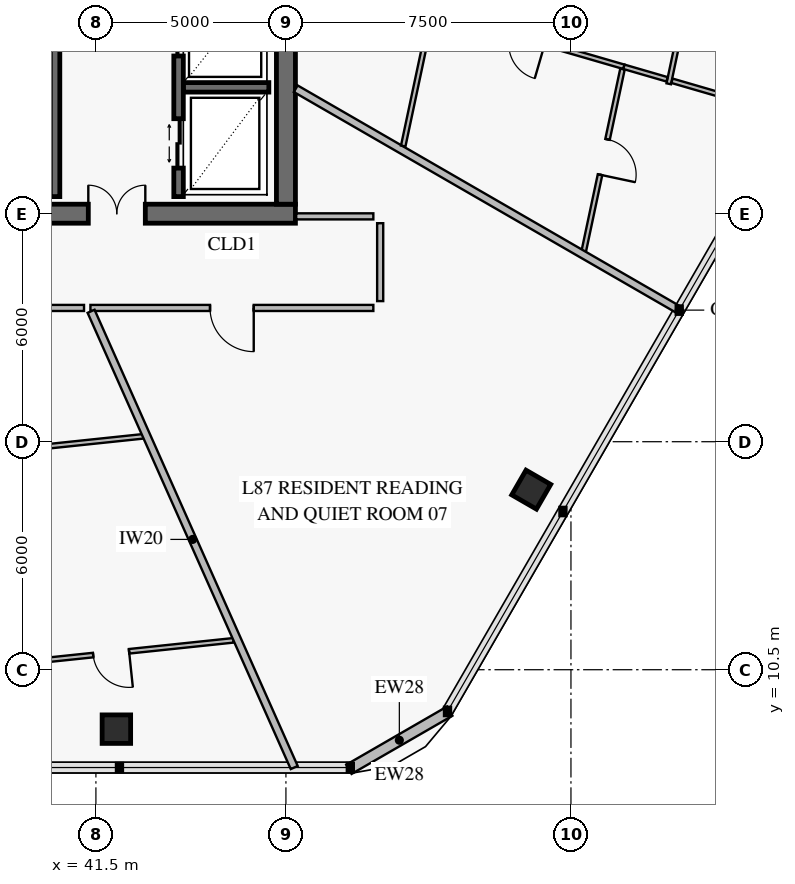
"""IFC4 building model, lengths in metres.
Left out: names, types, materials, properties, quantities, classifications, styles, units other than length and angle.
Written with IfcOpenShell. Run it as: python <this file> out.ifc"""

import sys

from ifc_helpers import new_model, si_unit, direction, frame, frame_2d, origin, origin_2d, place, context, subcontext, project, spatial, rectangle, extrude, element, fill, save


model = new_model("IFC4")
c1 = context("Model", 3, precision=1e-05, world=origin(), true_north=direction((0.0, 1.0)))
c2 = subcontext(c1, "Body", "Model", "MODEL_VIEW")
j1 = project(units=[si_unit("LENGTHUNIT", "METRE"), si_unit("PLANEANGLEUNIT", "RADIAN")], contexts=[c1])
p1 = place(None, origin())
s1 = spatial("IfcSite", under=j1, at=p1, CompositionType="ELEMENT")
p2 = place(p1, origin())
s2 = spatial("IfcBuilding", under=s1, at=p2, CompositionType="ELEMENT")
p3 = place(p2, frame((0.0, 0.0, 342.4)))
s3 = spatial("IfcBuildingStorey", under=s2, at=p3, CompositionType="ELEMENT", Elevation=342.4)
p4 = place(p3, frame((37.35, 22.5, 0.0), z_axis=(0.0, 0.0, 1.0), x_axis=(1.0, 0.0, 0.0)))
e1 = element("IfcWall", 1, at=p4, inside=s3, PredefinedType="SHEAR", context=c2, shape_type="SweptSolid", body=[
    extrude(rectangle(XDim=9.4, YDim=0.5, at=frame_2d((4.7, 0.0))), origin(), (0.0, 0.0, 1.0), 3.8),
])
p5 = place(p4, frame((3.95, 0.0, 0.0)))
e2 = element("IfcOpeningElement", 2, at=p5, cuts=e1, PredefinedType="OPENING", context=c2, shape_type="SweptSolid", body=[
    extrude(rectangle(XDim=1.5, YDim=2.15, at=frame_2d((0.75, 1.075))), frame((0.0, 0.262, 0.0), z_axis=(0.0, -1.0, 0.0), x_axis=(1.0, 0.0, 0.0)), (0.0, 0.0, 1.0), 0.524),
])
p6 = place(p3, frame((46.5, 22.75, 0.0), z_axis=(0.0, 0.0, 1.0), x_axis=(0.0, 1.0, 0.0)))
e3 = element("IfcWall", 3, at=p6, inside=s3, PredefinedType="SHEAR", context=c2, shape_type="SweptSolid", body=[
    extrude(rectangle(XDim=18.5, YDim=0.5, at=frame_2d((9.25, 0.0))), origin(), (0.0, 0.0, 1.0), 3.8),
])
p7 = place(p6, frame((9.0, 0.0, 0.0)))
e4 = element("IfcOpeningElement", 4, at=p7, cuts=e3, PredefinedType="OPENING", context=c2, shape_type="SweptSolid", body=[
    extrude(rectangle(XDim=1.1, YDim=2.15, at=frame_2d((0.55, 1.075))), frame((0.0, 0.262, 0.0), z_axis=(0.0, -1.0, 0.0), x_axis=(1.0, 0.0, 0.0)), (0.0, 0.0, 1.0), 0.524),
])
for number, where, z_axis, x_axis in (
    (5, (42.039, 8.936, 0.0), (0.0, 0.0, 1.0), (1.0, 0.0, 0.0)),
    (6, (52.955, 15.238, 0.0), (0.0, 0.0, 1.0), (0.5, 0.866, 0.0)),
):
    element("IfcColumn", number, at=place(p3, frame(where, z_axis=z_axis, x_axis=x_axis)), inside=s3, PredefinedType="COLUMN", context=c2, shape_type="SweptSolid", body=[
        extrude(rectangle(XDim=0.75, YDim=0.75, at=origin_2d()), origin(), (0.0, 0.0, 1.0), 3.55),
    ])
p8 = place(p3, frame((50.811, 9.411, 0.0), z_axis=(0.0, 0.0, 1.0), x_axis=(-0.866023752521, -0.50000286006, 0.0)))
e7 = element("IfcWall", 7, at=p8, inside=s3, PredefinedType="SOLIDWALL", context=c2, shape_type="SweptSolid", body=[
    extrude(rectangle(XDim=3.065, YDim=0.28, at=frame_2d((1.532, 0.0))), origin(), (0.0, 0.0, 1.0), 3.55),
])
p9 = place(p3, frame((40.425, 22.95, 0.0), z_axis=(0.0, 0.0, 1.0), x_axis=(0.0, 1.0, 0.0)))
e8 = element("IfcWall", 8, at=p9, inside=s3, PredefinedType="SOLIDWALL", context=c2, shape_type="SweptSolid", body=[
    extrude(rectangle(XDim=8.2, YDim=0.25, at=frame_2d((4.1, 0.0))), origin(), (0.0, 0.0, 1.0), 3.8),
])
p10 = place(p3, frame((43.8, 25.825, 0.0), z_axis=(0.0, 0.0, 1.0), x_axis=(1.0, 0.0, 0.0)))
e9 = element("IfcWall", 9, at=p10, inside=s3, PredefinedType="SOLIDWALL", context=c2, shape_type="SweptSolid", body=[
    extrude(rectangle(XDim=2.25, YDim=0.25, at=frame_2d((1.125, 0.0))), origin(), (0.0, 0.0, 1.0), 3.8),
])
p11 = place(p3, frame((43.675, 22.95, 0.0), z_axis=(0.0, 0.0, 1.0), x_axis=(0.0, 1.0, 0.0)))
e10 = element("IfcWall", 10, at=p11, inside=s3, PredefinedType="SOLIDWALL", context=c2, shape_type="SweptSolid", body=[
    extrude(rectangle(XDim=8.2, YDim=0.25, at=frame_2d((4.1, 0.0))), origin(), (0.0, 0.0, 1.0), 3.8),
])
p12 = place(p11, frame((0.75, 0.0, 0.0)))
e11 = element("IfcOpeningElement", 11, at=p12, cuts=e10, PredefinedType="OPENING", context=c2, shape_type="SweptSolid", body=[
    extrude(rectangle(XDim=1.3, YDim=2.3, at=frame_2d((0.65, 1.15))), frame((0.0, 0.137, 0.0), z_axis=(0.0, -1.0, 0.0), x_axis=(1.0, 0.0, 0.0)), (0.0, 0.0, 1.0), 0.274),
])
p13 = place(p11, frame((3.7, 0.0, 0.0)))
e12 = element("IfcOpeningElement", 12, at=p13, cuts=e10, PredefinedType="OPENING", context=c2, shape_type="SweptSolid", body=[
    extrude(rectangle(XDim=1.3, YDim=2.3, at=frame_2d((0.65, 1.15))), frame((0.0, 0.137, 0.0), z_axis=(0.0, -1.0, 0.0), x_axis=(1.0, 0.0, 0.0)), (0.0, 0.0, 1.0), 0.274),
])
p14 = place(p11, frame((6.62, 0.0, 0.0)))
e13 = element("IfcOpeningElement", 13, at=p14, cuts=e10, PredefinedType="OPENING", context=c2, shape_type="SweptSolid", body=[
    extrude(rectangle(XDim=0.9, YDim=2.1, at=frame_2d((0.45, 1.05))), frame((0.0, 0.137, 0.0), z_axis=(0.0, -1.0, 0.0), x_axis=(1.0, 0.0, 0.0)), (0.0, 0.0, 1.0), 0.274),
])
p15 = place(p3, frame((38.846, 10.614, 0.0), z_axis=(0.0, 0.0, 1.0), x_axis=(0.994523460233, 0.1045135735, 0.0)))
e14 = element("IfcWall", 14, at=p15, inside=s3, PredefinedType="PARTITIONING", context=c2, shape_type="SweptSolid", body=[
    extrude(rectangle(XDim=6.31, YDim=0.12, at=frame_2d((3.155, 0.0))), origin(), (0.0, 0.0, 1.0), 3.0),
])
p16 = place(p15, frame((2.596, 0.0, 0.0)))
e15 = element("IfcOpeningElement", 15, at=p16, cuts=e14, PredefinedType="OPENING", context=c2, shape_type="SweptSolid", body=[
    extrude(rectangle(XDim=0.95, YDim=2.1, at=frame_2d((0.475, 1.05))), frame((0.0, 0.072, 0.0), z_axis=(0.0, -1.0, 0.0), x_axis=(1.0, 0.0, 0.0)), (0.0, 0.0, 1.0), 0.144),
])
p17 = place(p3, frame((41.356, 20.02, 0.0), z_axis=(0.0, 0.0, 1.0), x_axis=(1.0, 0.0, 0.0)))
e16 = element("IfcWall", 16, at=p17, inside=s3, PredefinedType="PARTITIONING", context=c2, shape_type="SweptSolid", body=[
    extrude(rectangle(XDim=7.444, YDim=0.16, at=frame_2d((3.722, 0.0))), origin(), (0.0, 0.0, 1.0), 3.0),
])
p18 = place(p17, frame((3.147, 0.0, 0.0)))
e17 = element("IfcOpeningElement", 17, at=p18, cuts=e16, PredefinedType="OPENING", context=c2, shape_type="SweptSolid", body=[
    extrude(rectangle(XDim=1.15, YDim=2.2, at=frame_2d((0.575, 1.1))), frame((0.0, 0.092, 0.0), z_axis=(0.0, -1.0, 0.0), x_axis=(1.0, 0.0, 0.0)), (0.0, 0.0, 1.0), 0.184),
])
p19 = place(p3, frame((56.573, 25.919, 0.0), z_axis=(0.0, 0.0, 1.0), x_axis=(0.207884804538, 0.978153315203, 0.0)))
e18 = element("IfcWall", 18, at=p19, inside=s3, PredefinedType="PARTITIONING", context=c2, shape_type="SweptSolid", body=[
    extrude(rectangle(XDim=8.519, YDim=0.12, at=frame_2d((4.26, 0.0))), origin(), (0.0, 0.0, 1.0), 3.0),
])
p20 = place(p19, frame((1.728, 0.0, 0.0)))
e19 = element("IfcOpeningElement", 19, at=p20, cuts=e18, PredefinedType="OPENING", context=c2, shape_type="SweptSolid", body=[
    extrude(rectangle(XDim=0.95, YDim=2.1, at=frame_2d((0.475, 1.05))), frame((0.0, 0.072, 0.0), z_axis=(0.0, -1.0, 0.0), x_axis=(1.0, 0.0, 0.0)), (0.0, 0.0, 1.0), 0.144),
])
p21 = place(p19, frame((5.747, 0.0, 0.0)))
e20 = element("IfcOpeningElement", 20, at=p21, cuts=e18, PredefinedType="OPENING", context=c2, shape_type="SweptSolid", body=[
    extrude(rectangle(XDim=0.95, YDim=2.1, at=frame_2d((0.475, 1.05))), frame((0.0, 0.072, 0.0), z_axis=(0.0, -1.0, 0.0), x_axis=(1.0, 0.0, 0.0)), (0.0, 0.0, 1.0), 0.144),
])
p22 = place(p3, frame((50.365, 27.826, 0.0), z_axis=(0.0, 0.0, 1.0), x_axis=(0.960293456694, -0.278991894201, 0.0)))
e21 = element("IfcWall", 21, at=p22, inside=s3, PredefinedType="PARTITIONING", context=c2, shape_type="SweptSolid", body=[
    extrude(rectangle(XDim=5.237, YDim=0.12, at=frame_2d((2.618, 0.0))), origin(), (0.0, 0.0, 1.0), 3.2),
])
p23 = place(p22, frame((2.118, 0.0, 0.0)))
e22 = element("IfcOpeningElement", 22, at=p23, cuts=e21, PredefinedType="OPENING", context=c2, shape_type="SweptSolid", body=[
    extrude(rectangle(XDim=0.95, YDim=2.1, at=frame_2d((0.475, 1.05))), frame((0.0, 0.072, 0.0), z_axis=(0.0, -1.0, 0.0), x_axis=(1.0, 0.0, 0.0)), (0.0, 0.0, 1.0), 0.144),
])
p24 = place(p3, frame((54.336, 21.511, 0.0), z_axis=(0.0, 0.0, 1.0), x_axis=(0.207920104204, 0.978145812376, 0.0)))
e23 = element("IfcWall", 23, at=p24, inside=s3, PredefinedType="PARTITIONING", context=c2, shape_type="SweptSolid", body=[
    extrude(rectangle(XDim=4.902, YDim=0.12, at=frame_2d((2.451, 0.0))), origin(), (0.0, 0.0, 1.0), 3.55),
])
p25 = place(p24, frame((2.06, 0.0, 0.0)))
e24 = element("IfcOpeningElement", 24, at=p25, cuts=e23, PredefinedType="OPENING", context=c2, shape_type="SweptSolid", body=[
    extrude(rectangle(XDim=0.95, YDim=2.1, at=frame_2d((0.475, 1.05))), frame((0.0, 0.072, 0.0), z_axis=(0.0, -1.0, 0.0), x_axis=(1.0, 0.0, 0.0)), (0.0, 0.0, 1.0), 0.144),
])
p26 = place(p3, frame((38.126, 16.156, 0.0), z_axis=(0.0, 0.0, 1.0), x_axis=(0.994525709455, 0.104492168289, 0.0)))
e25 = element("IfcWall", 25, at=p26, inside=s3, PredefinedType="PARTITIONING", context=c2, shape_type="SweptSolid", body=[
    extrude(rectangle(XDim=4.685, YDim=0.12, at=frame_2d((2.342, 0.0))), origin(), (0.0, 0.0, 1.0), 3.0),
])
p27 = place(p3, frame((41.373, 19.932, 0.0), z_axis=(0.0, 0.0, 1.0), x_axis=(0.406736471648, -0.913545533967, 0.0)))
e26 = element("IfcWall", 26, at=p27, inside=s3, PredefinedType="PARTITIONING", context=c2, shape_type="SweptSolid", body=[
    extrude(rectangle(XDim=13.142, YDim=0.2, at=frame_2d((6.571, 0.0))), origin(), (0.0, 0.0, 1.0), 2.97),
])
p28 = place(p3, frame((46.758, 25.789, 0.0), z_axis=(0.0, 0.0, 1.0), x_axis=(0.866025778731, -0.499999350573, 0.0)))
e27 = element("IfcWall", 27, at=p28, inside=s3, PredefinedType="PARTITIONING", context=c2, shape_type="SweptSolid", body=[
    extrude(rectangle(XDim=11.652, YDim=0.2, at=frame_2d((5.826, 0.0))), origin(), (0.0, 0.0, 1.0), 2.97),
])
p29 = place(p3, frame((55.394, 26.365, 0.0), z_axis=(0.0, 0.0, 1.0), x_axis=(0.960281932935, -0.279031556062, 0.0)))
e28 = element("IfcWall", 28, at=p29, inside=s3, PredefinedType="PARTITIONING", context=c2, shape_type="SweptSolid", body=[
    extrude(rectangle(XDim=1.181, YDim=0.12, at=frame_2d((0.591, 0.0))), origin(), (0.0, 0.0, 1.0), 3.55),
])
p30 = place(p3, frame((56.659, 25.998, 0.0), z_axis=(0.0, 0.0, 1.0), x_axis=(0.960282504677, -0.279029588417, 0.0)))
e29 = element("IfcWall", 29, at=p30, inside=s3, PredefinedType="PARTITIONING", context=c2, shape_type="SweptSolid", body=[
    extrude(rectangle(XDim=2.02, YDim=0.12, at=frame_2d((1.01, 0.0))), origin(), (0.0, 0.0, 1.0), 3.55),
])
p31 = place(p3, frame((49.586, 24.281, 0.0), z_axis=(0.0, 0.0, 1.0), x_axis=(0.207984930921, 0.978132030203, 0.0)))
e30 = element("IfcWall", 30, at=p31, inside=s3, PredefinedType="PARTITIONING", context=c2, shape_type="SweptSolid", body=[
    extrude(rectangle(XDim=3.564, YDim=0.12, at=frame_2d((1.782, 0.0))), origin(), (0.0, 0.0, 1.0), 3.55),
])
p32 = place(p3, frame((37.625, 20.02, 0.0), z_axis=(0.0, 0.0, 1.0), x_axis=(1.0, 0.0, 0.0)))
e31 = element("IfcWall", 31, at=p32, inside=s3, PredefinedType="PARTITIONING", context=c2, shape_type="SweptSolid", body=[
    extrude(rectangle(XDim=3.563, YDim=0.16, at=frame_2d((1.781, 0.0))), origin(), (0.0, 0.0, 1.0), 3.0),
])
p33 = place(p3, frame((48.98, 20.2, 0.0), z_axis=(0.0, 0.0, 1.0), x_axis=(0.0, 1.0, 0.0)))
e32 = element("IfcWall", 32, at=p33, inside=s3, PredefinedType="PARTITIONING", context=c2, shape_type="SweptSolid", body=[
    extrude(rectangle(XDim=2.05, YDim=0.16, at=frame_2d((1.025, 0.0))), origin(), (0.0, 0.0, 1.0), 3.55),
])
p34 = place(p3, frame((48.8, 22.43, 0.0), z_axis=(0.0, 0.0, 1.0), x_axis=(-1.0, 0.0, 0.0)))
e33 = element("IfcWall", 33, at=p34, inside=s3, PredefinedType="PARTITIONING", context=c2, shape_type="SweptSolid", body=[
    extrude(rectangle(XDim=2.03, YDim=0.16, at=frame_2d((1.015, 0.0))), origin(), (0.0, 0.0, 1.0), 3.55),
])
p35 = place(p5, origin())
e34 = element("IfcDoor", 34, at=p35, inside=s3, OperationType="DOUBLE_DOOR_SINGLE_SWING", PredefinedType="DOOR", context=c2, shape_type="SweptSolid", body=[
    extrude(rectangle(XDim=1.5, YDim=2.15, at=frame_2d((0.75, 1.075))), frame((0.0, 0.025, 0.0), z_axis=(0.0, -1.0, 0.0), x_axis=(1.0, 0.0, 0.0)), (0.0, 0.0, 1.0), 0.05),
])
fill(e2, e34)
p36 = place(p12, origin())
e35 = element("IfcDoor", 35, at=p36, inside=s3, OperationType="DOUBLE_DOOR_SLIDING", PredefinedType="DOOR", context=c2, shape_type="SweptSolid", body=[
    extrude(rectangle(XDim=1.3, YDim=2.3, at=frame_2d((0.65, 1.15))), frame((0.0, 0.025, 0.0), z_axis=(0.0, -1.0, 0.0), x_axis=(1.0, 0.0, 0.0)), (0.0, 0.0, 1.0), 0.05),
])
fill(e11, e35)
p37 = place(p13, origin())
e36 = element("IfcDoor", 36, at=p37, inside=s3, OperationType="DOUBLE_DOOR_SLIDING", PredefinedType="DOOR", context=c2, shape_type="SweptSolid", body=[
    extrude(rectangle(XDim=1.3, YDim=2.3, at=frame_2d((0.65, 1.15))), frame((0.0, 0.025, 0.0), z_axis=(0.0, -1.0, 0.0), x_axis=(1.0, 0.0, 0.0)), (0.0, 0.0, 1.0), 0.05),
])
fill(e12, e36)
p38 = place(p16, frame((0.95, 0.0, 0.0), z_axis=(0.0, 0.0, 1.0), x_axis=(-1.0, 0.0, 0.0)))
e37 = element("IfcDoor", 37, at=p38, inside=s3, OperationType="SINGLE_SWING_LEFT", PredefinedType="DOOR", context=c2, shape_type="SweptSolid", body=[
    extrude(rectangle(XDim=0.95, YDim=2.1, at=frame_2d((0.475, 1.05))), frame((0.0, 0.025, 0.0), z_axis=(0.0, -1.0, 0.0), x_axis=(1.0, 0.0, 0.0)), (0.0, 0.0, 1.0), 0.05),
])
fill(e15, e37)
p39 = place(p18, frame((1.15, 0.0, 0.0), z_axis=(0.0, 0.0, 1.0), x_axis=(-1.0, 0.0, 0.0)))
e38 = element("IfcDoor", 38, at=p39, inside=s3, OperationType="SINGLE_SWING_LEFT", PredefinedType="DOOR", context=c2, shape_type="SweptSolid", body=[
    extrude(rectangle(XDim=1.15, YDim=2.2, at=frame_2d((0.575, 1.1))), frame((0.0, 0.025, 0.0), z_axis=(0.0, -1.0, 0.0), x_axis=(1.0, 0.0, 0.0)), (0.0, 0.0, 1.0), 0.05),
])
fill(e17, e38)
p40 = place(p25, frame((0.95, 0.0, 0.0), z_axis=(0.0, 0.0, 1.0), x_axis=(-1.0, 0.0, 0.0)))
e39 = element("IfcDoor", 39, at=p40, inside=s3, OperationType="SINGLE_SWING_RIGHT", PredefinedType="DOOR", context=c2, shape_type="SweptSolid", body=[
    extrude(rectangle(XDim=0.95, YDim=2.1, at=frame_2d((0.475, 1.05))), frame((0.0, 0.025, 0.0), z_axis=(0.0, -1.0, 0.0), x_axis=(1.0, 0.0, 0.0)), (0.0, 0.0, 1.0), 0.05),
])
fill(e24, e39)
save(model, sys.argv[1])
